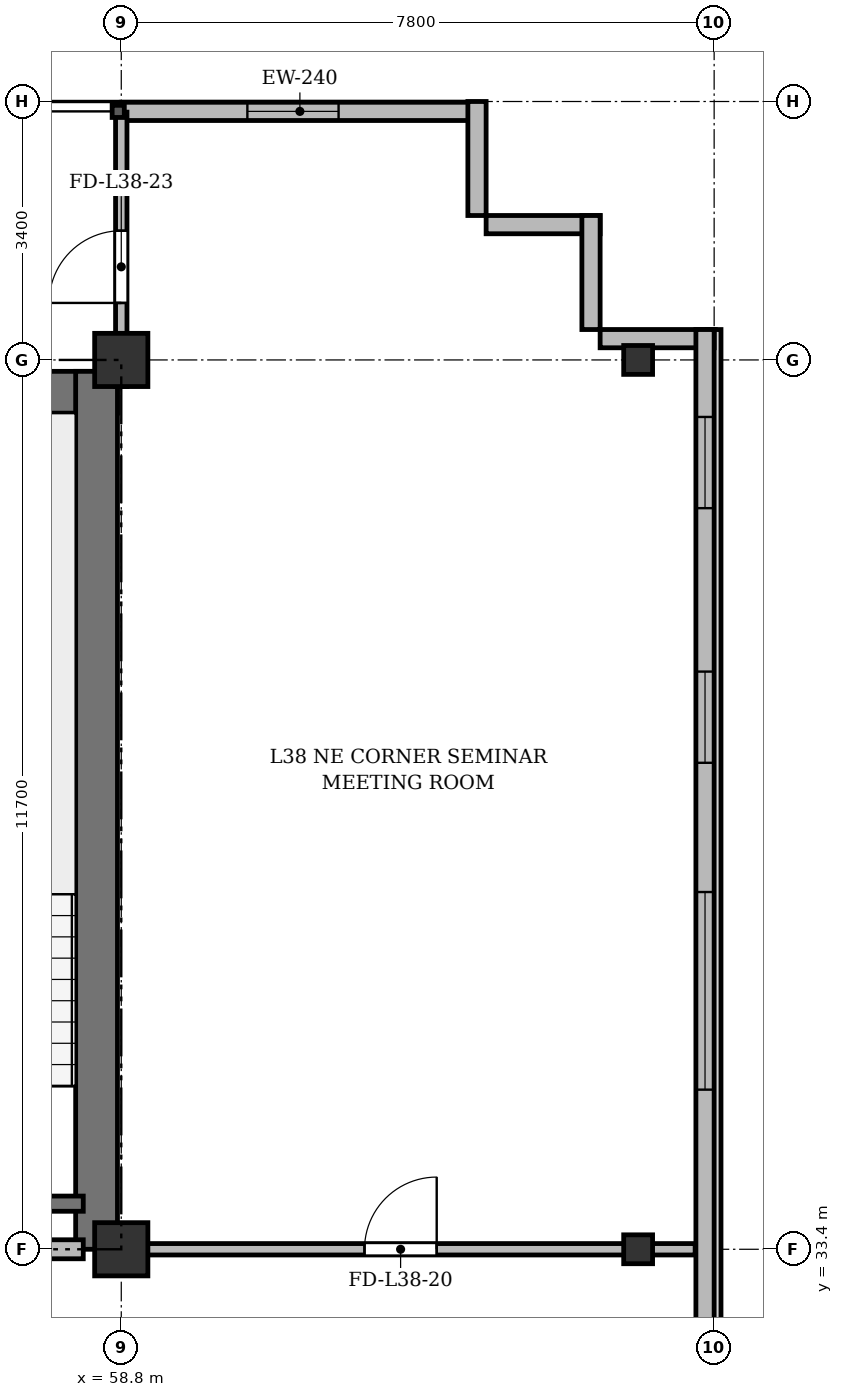
"""IFC4 building model, lengths in metres.
Left out: names, types, materials, properties, quantities, classifications, styles, units other than length and angle.
Written with IfcOpenShell. Run it as: python <this file> out.ifc"""

import sys

from ifc_helpers import new_model, si_unit, direction, frame, frame_2d, origin, origin_2d, place, context, subcontext, project, spatial, rectangle, i_section, extrude, source, transform, mapped, element, fill, save


model = new_model("IFC4")
c1 = context("Model", 3, precision=1e-05, world=origin(), true_north=direction((0.0, 1.0)))
c2 = subcontext(c1, "Body", "Model", "MODEL_VIEW")
j1 = project(units=[si_unit("LENGTHUNIT", "METRE"), si_unit("PLANEANGLEUNIT", "RADIAN")], contexts=[c1])
p1 = place(None, origin())
s1 = spatial("IfcSite", under=j1, at=p1, CompositionType="ELEMENT")
p2 = place(p1, origin())
s2 = spatial("IfcBuilding", under=s1, at=p2, CompositionType="ELEMENT")
p3 = place(p2, frame((0.0, 0.0, 146.5)))
s3 = spatial("IfcBuildingStorey", under=s2, at=p3, CompositionType="ELEMENT", Elevation=146.5)
m1 = source(origin(), c2, "Body", "SweptSolid", [
    extrude(rectangle(XDim=0.7, YDim=0.7, at=origin_2d()), origin(), (0.0, 0.0, 1.0), 3.6),
])
for number, where, z_axis, x_axis in (
    (1, (58.8, 33.4, 0.0), (0.0, 0.0, 1.0), (1.0, 0.0, 0.0)),
    (2, (58.8, 45.1, 0.0), (0.0, 0.0, 1.0), (1.0, 0.0, 0.0)),
):
    element("IfcColumn", number, at=place(p3, frame(where, z_axis=z_axis, x_axis=x_axis)), inside=s3, PredefinedType="COLUMN", context=c2, shape_type="MappedRepresentation", body=[
        mapped(m1, transform((0.0, 0.0, 0.0), x_axis=(1.0, 0.0, 0.0), y_axis=(0.0, 1.0, 0.0), z_axis=(0.0, 0.0, 1.0), scale=1.0)),
    ])
m2 = source(origin(), c2, "Body", "SweptSolid", [
    extrude(i_section(OverallWidth=0.38, OverallDepth=0.38, WebThickness=0.02, FlangeThickness=0.03, at=origin_2d()), origin(), (0.0, 0.0, 1.0), 3.6),
])
for number, where, z_axis, x_axis in (
    (3, (65.6, 33.4, 0.0), (0.0, 0.0, 1.0), (1.0, 0.0, 0.0)),
    (4, (65.6, 45.1, 0.0), (0.0, 0.0, 1.0), (1.0, 0.0, 0.0)),
):
    element("IfcColumn", number, at=place(p3, frame(where, z_axis=z_axis, x_axis=x_axis)), inside=s3, PredefinedType="COLUMN", context=c2, shape_type="MappedRepresentation", body=[
        mapped(m2, transform((0.0, 0.0, 0.0), x_axis=(1.0, 0.0, 0.0), y_axis=(0.0, 1.0, 0.0), z_axis=(0.0, 0.0, 1.0), scale=1.0)),
    ])
p4 = place(p3, frame((58.8, 48.37, 0.0), z_axis=(0.0, 0.0, 1.0), x_axis=(1.0, 0.0, 0.0)))
e5 = element("IfcWall", 5, at=p4, inside=s3, PredefinedType="SOLIDWALL", context=c2, shape_type="SweptSolid", body=[
    extrude(rectangle(XDim=4.7, YDim=0.24, at=frame_2d((2.35, 0.0))), origin(), (0.0, 0.0, 1.0), 3.35),
])
p5 = place(p4, frame((1.659, 0.0, 0.9)))
e6 = element("IfcOpeningElement", 6, at=p5, cuts=e5, PredefinedType="OPENING", context=c2, shape_type="SweptSolid", body=[
    extrude(rectangle(XDim=1.2, YDim=1.65, at=frame_2d((0.6, 0.825))), frame((0.0, 0.13, 0.0), z_axis=(0.0, -1.0, 0.0), x_axis=(1.0, 0.0, 0.0)), (0.0, 0.0, 1.0), 0.26),
])
for number, where, z_axis, x_axis in (
    (7, (63.48, 48.5, 0.0), (0.0, 0.0, 1.0), (0.0, -1.0, 0.0)),
    (8, (63.6, 46.88, 0.0), (0.0, 0.0, 1.0), (1.0, 0.0, 0.0)),
    (9, (64.98, 47.0, 0.0), (0.0, 0.0, 1.0), (0.0, -1.0, 0.0)),
    (10, (65.1, 45.38, 0.0), (0.0, 0.0, 1.0), (1.0, 0.0, 0.0)),
):
    element("IfcWall", number, at=place(p3, frame(where, z_axis=z_axis, x_axis=x_axis)), inside=s3, PredefinedType="SOLIDWALL", context=c2, shape_type="SweptSolid", body=[
        extrude(rectangle(XDim=1.5, YDim=0.24, at=frame_2d((0.75, 0.0))), origin(), (0.0, 0.0, 1.0), 3.35),
    ])
p6 = place(p3, frame((66.48, 45.5, 0.0), z_axis=(0.0, 0.0, 1.0), x_axis=(0.0, -1.0, 0.0)))
e11 = element("IfcWall", 11, at=p6, inside=s3, PredefinedType="SOLIDWALL", context=c2, shape_type="SweptSolid", body=[
    extrude(rectangle(XDim=39.2, YDim=0.24, at=frame_2d((19.6, 0.0))), origin(), (0.0, 0.0, 1.0), 3.35),
])
p7 = place(p6, frame((36.55, 0.0, 0.92)))
e12 = element("IfcOpeningElement", 12, at=p7, cuts=e11, PredefinedType="OPENING", context=c2, shape_type="SweptSolid", body=[
    extrude(rectangle(XDim=1.2, YDim=1.65, at=frame_2d((0.6, 0.825))), frame((0.0, 0.13, 0.0), z_axis=(0.0, -1.0, 0.0), x_axis=(1.0, 0.0, 0.0)), (0.0, 0.0, 1.0), 0.26),
])
p8 = place(p6, frame((32.8, 0.0, 0.92)))
e13 = element("IfcOpeningElement", 13, at=p8, cuts=e11, PredefinedType="OPENING", context=c2, shape_type="SweptSolid", body=[
    extrude(rectangle(XDim=2.6, YDim=1.9, at=frame_2d((1.3, 0.95))), frame((0.0, 0.13, 0.0), z_axis=(0.0, -1.0, 0.0), x_axis=(1.0, 0.0, 0.0)), (0.0, 0.0, 1.0), 0.26),
])
p9 = place(p6, frame((28.6, 0.0, 0.92)))
e14 = element("IfcOpeningElement", 14, at=p9, cuts=e11, PredefinedType="OPENING", context=c2, shape_type="SweptSolid", body=[
    extrude(rectangle(XDim=2.6, YDim=1.9, at=frame_2d((1.3, 0.95))), frame((0.0, 0.13, 0.0), z_axis=(0.0, -1.0, 0.0), x_axis=(1.0, 0.0, 0.0)), (0.0, 0.0, 1.0), 0.26),
])
p10 = place(p6, frame((21.4, 0.0, 0.92)))
e15 = element("IfcOpeningElement", 15, at=p10, cuts=e11, PredefinedType="OPENING", context=c2, shape_type="SweptSolid", body=[
    extrude(rectangle(XDim=2.6, YDim=1.9, at=frame_2d((1.3, 0.95))), frame((0.0, 0.13, 0.0), z_axis=(0.0, -1.0, 0.0), x_axis=(1.0, 0.0, 0.0)), (0.0, 0.0, 1.0), 0.26),
])
p11 = place(p6, frame((7.4, 0.0, 0.92)))
e16 = element("IfcOpeningElement", 16, at=p11, cuts=e11, PredefinedType="OPENING", context=c2, shape_type="SweptSolid", body=[
    extrude(rectangle(XDim=2.6, YDim=1.9, at=frame_2d((1.3, 0.95))), frame((0.0, 0.13, 0.0), z_axis=(0.0, -1.0, 0.0), x_axis=(1.0, 0.0, 0.0)), (0.0, 0.0, 1.0), 0.26),
])
p12 = place(p6, frame((4.5, 0.0, 0.92)))
e17 = element("IfcOpeningElement", 17, at=p12, cuts=e11, PredefinedType="OPENING", context=c2, shape_type="SweptSolid", body=[
    extrude(rectangle(XDim=1.2, YDim=1.65, at=frame_2d((0.6, 0.825))), frame((0.0, 0.13, 0.0), z_axis=(0.0, -1.0, 0.0), x_axis=(1.0, 0.0, 0.0)), (0.0, 0.0, 1.0), 0.26),
])
p13 = place(p6, frame((1.15, 0.0, 0.92)))
e18 = element("IfcOpeningElement", 18, at=p13, cuts=e11, PredefinedType="OPENING", context=c2, shape_type="SweptSolid", body=[
    extrude(rectangle(XDim=1.2, YDim=1.65, at=frame_2d((0.6, 0.825))), frame((0.0, 0.13, 0.0), z_axis=(0.0, -1.0, 0.0), x_axis=(1.0, 0.0, 0.0)), (0.0, 0.0, 1.0), 0.26),
])
p14 = place(p3, frame((15.65, 44.675, 0.0), z_axis=(0.0, 0.0, 1.0), x_axis=(1.0, 0.0, 0.0)))
e19 = element("IfcWall", 19, at=p14, inside=s3, PredefinedType="SHEAR", context=c2, shape_type="SweptSolid", body=[
    extrude(rectangle(XDim=43.1, YDim=0.55, at=frame_2d((21.55, 0.0))), origin(), (0.0, 0.0, 1.0), 3.35),
])
p15 = place(p3, frame((58.475, 33.4, 0.0), z_axis=(0.0, 0.0, 1.0), x_axis=(0.0, 1.0, 0.0)))
e20 = element("IfcWall", 20, at=p15, inside=s3, PredefinedType="SHEAR", context=c2, shape_type="SweptSolid", body=[
    extrude(rectangle(XDim=11.55, YDim=0.55, at=frame_2d((5.775, 0.0))), origin(), (0.0, 0.0, 1.0), 3.35),
])
p16 = place(p3, frame((54.9, 34.0, 0.0), z_axis=(0.0, 0.0, 1.0), x_axis=(1.0, 0.0, 0.0)))
e21 = element("IfcWall", 21, at=p16, inside=s3, PredefinedType="SHEAR", context=c2, shape_type="SweptSolid", body=[
    extrude(rectangle(XDim=3.4, YDim=0.2, at=frame_2d((1.7, 0.0))), origin(), (0.0, 0.0, 1.0), 3.35),
])
p17 = place(p3, frame((47.15, 33.4, 0.0), z_axis=(0.0, 0.0, 1.0), x_axis=(1.0, 0.0, 0.0)))
e22 = element("IfcWall", 22, at=p17, inside=s3, PredefinedType="PARTITIONING", context=c2, shape_type="SweptSolid", body=[
    extrude(rectangle(XDim=11.15, YDim=0.25, at=frame_2d((5.575, 0.0))), origin(), (0.0, 0.0, 1.0), 2.75),
])
p18 = place(p17, frame((0.7, 0.0, 0.0)))
e23 = element("IfcOpeningElement", 23, at=p18, cuts=e22, PredefinedType="OPENING", context=c2, shape_type="SweptSolid", body=[
    extrude(rectangle(XDim=0.95, YDim=2.15, at=frame_2d((0.475, 1.075))), frame((0.0, 0.135, 0.0), z_axis=(0.0, -1.0, 0.0), x_axis=(1.0, 0.0, 0.0)), (0.0, 0.0, 1.0), 0.27),
])
p19 = place(p17, frame((6.0, 0.0, 0.0)))
e24 = element("IfcOpeningElement", 24, at=p19, cuts=e22, PredefinedType="OPENING", context=c2, shape_type="SweptSolid", body=[
    extrude(rectangle(XDim=1.2, YDim=2.15, at=frame_2d((0.6, 1.075))), frame((0.0, 0.135, 0.0), z_axis=(0.0, -1.0, 0.0), x_axis=(1.0, 0.0, 0.0)), (0.0, 0.0, 1.0), 0.27),
])
p20 = place(p3, frame((58.8, 33.4, 0.0), z_axis=(0.0, 0.0, 1.0), x_axis=(1.0, 0.0, 0.0)))
e25 = element("IfcWall", 25, at=p20, inside=s3, PredefinedType="PARTITIONING", context=c2, shape_type="SweptSolid", body=[
    extrude(rectangle(XDim=7.55, YDim=0.15, at=frame_2d((3.775, 0.0))), origin(), (0.0, 0.0, 1.0), 2.75),
])
p21 = place(p20, frame((3.2, 0.0, 0.0)))
e26 = element("IfcOpeningElement", 26, at=p21, cuts=e25, PredefinedType="OPENING", context=c2, shape_type="SweptSolid", body=[
    extrude(rectangle(XDim=0.95, YDim=2.15, at=frame_2d((0.475, 1.075))), frame((0.0, 0.085, 0.0), z_axis=(0.0, -1.0, 0.0), x_axis=(1.0, 0.0, 0.0)), (0.0, 0.0, 1.0), 0.17),
])
p22 = place(p3, frame((58.8, 44.75, 0.0), z_axis=(0.0, 0.0, 1.0), x_axis=(0.0, 1.0, 0.0)))
e27 = element("IfcWall", 27, at=p22, inside=s3, PredefinedType="PARTITIONING", context=c2, shape_type="SweptSolid", body=[
    extrude(rectangle(XDim=3.61, YDim=0.15, at=frame_2d((1.805, 0.0))), origin(), (0.0, 0.0, 1.0), 2.85),
])
p23 = place(p22, frame((1.1, 0.0, 0.0)))
e28 = element("IfcOpeningElement", 28, at=p23, cuts=e27, PredefinedType="OPENING", context=c2, shape_type="SweptSolid", body=[
    extrude(rectangle(XDim=0.95, YDim=2.15, at=frame_2d((0.475, 1.075))), frame((0.0, 0.085, 0.0), z_axis=(0.0, -1.0, 0.0), x_axis=(1.0, 0.0, 0.0)), (0.0, 0.0, 1.0), 0.17),
])
m3 = source(origin(), c2, "Body", "SweptSolid", [
    extrude(rectangle(XDim=1.2, YDim=1.65, at=frame_2d((0.6, 0.825))), frame((0.0, 0.03, 0.0), z_axis=(0.0, -1.0, 0.0), x_axis=(1.0, 0.0, 0.0)), (0.0, 0.0, 1.0), 0.06),
])
p24 = place(p5, origin())
e29 = element("IfcWindow", 29, at=p24, inside=s3, PartitioningType="SINGLE_PANEL", PredefinedType="WINDOW", context=c2, shape_type="MappedRepresentation", body=[
    mapped(m3, transform((0.0, 0.0, 0.0), x_axis=(1.0, 0.0, 0.0), y_axis=(0.0, 1.0, 0.0), z_axis=(0.0, 0.0, 1.0), scale=1.0)),
])
fill(e6, e29)
m4 = source(origin(), c2, "Body", "SweptSolid", [
    extrude(rectangle(XDim=2.6, YDim=1.9, at=frame_2d((1.3, 0.95))), frame((0.0, 0.03, 0.0), z_axis=(0.0, -1.0, 0.0), x_axis=(1.0, 0.0, 0.0)), (0.0, 0.0, 1.0), 0.06),
])
p25 = place(p11, origin())
e30 = element("IfcWindow", 30, at=p25, inside=s3, PartitioningType="SINGLE_PANEL", PredefinedType="WINDOW", context=c2, shape_type="MappedRepresentation", body=[
    mapped(m4, transform((0.0, 0.0, 0.0), x_axis=(1.0, 0.0, 0.0), y_axis=(0.0, 1.0, 0.0), z_axis=(0.0, 0.0, 1.0), scale=1.0)),
])
fill(e16, e30)
p26 = place(p12, origin())
e31 = element("IfcWindow", 31, at=p26, inside=s3, PartitioningType="SINGLE_PANEL", PredefinedType="WINDOW", context=c2, shape_type="MappedRepresentation", body=[
    mapped(m3, transform((0.0, 0.0, 0.0), x_axis=(1.0, 0.0, 0.0), y_axis=(0.0, 1.0, 0.0), z_axis=(0.0, 0.0, 1.0), scale=1.0)),
])
fill(e17, e31)
p27 = place(p13, origin())
e32 = element("IfcWindow", 32, at=p27, inside=s3, PartitioningType="SINGLE_PANEL", PredefinedType="WINDOW", context=c2, shape_type="MappedRepresentation", body=[
    mapped(m3, transform((0.0, 0.0, 0.0), x_axis=(1.0, 0.0, 0.0), y_axis=(0.0, 1.0, 0.0), z_axis=(0.0, 0.0, 1.0), scale=1.0)),
])
fill(e18, e32)
m5 = source(origin(), c2, "Body", "SweptSolid", [
    extrude(rectangle(XDim=0.95, YDim=2.15, at=frame_2d((0.475, 1.075))), frame((0.0, 0.025, 0.0), z_axis=(0.0, -1.0, 0.0), x_axis=(1.0, 0.0, 0.0)), (0.0, 0.0, 1.0), 0.05),
])
p28 = place(p21, origin())
e33 = element("IfcDoor", 33, at=p28, inside=s3, OperationType="SINGLE_SWING_RIGHT", PredefinedType="DOOR", context=c2, shape_type="MappedRepresentation", body=[
    mapped(m5, transform((0.0, 0.0, 0.0), x_axis=(1.0, 0.0, 0.0), y_axis=(0.0, 1.0, 0.0), z_axis=(0.0, 0.0, 1.0), scale=1.0)),
])
fill(e26, e33)
p29 = place(p23, origin())
e34 = element("IfcDoor", 34, at=p29, inside=s3, OperationType="SINGLE_SWING_LEFT", PredefinedType="DOOR", context=c2, shape_type="MappedRepresentation", body=[
    mapped(m5, transform((0.0, 0.0, 0.0), x_axis=(1.0, 0.0, 0.0), y_axis=(0.0, 1.0, 0.0), z_axis=(0.0, 0.0, 1.0), scale=1.0)),
])
fill(e28, e34)
save(model, sys.argv[1])
